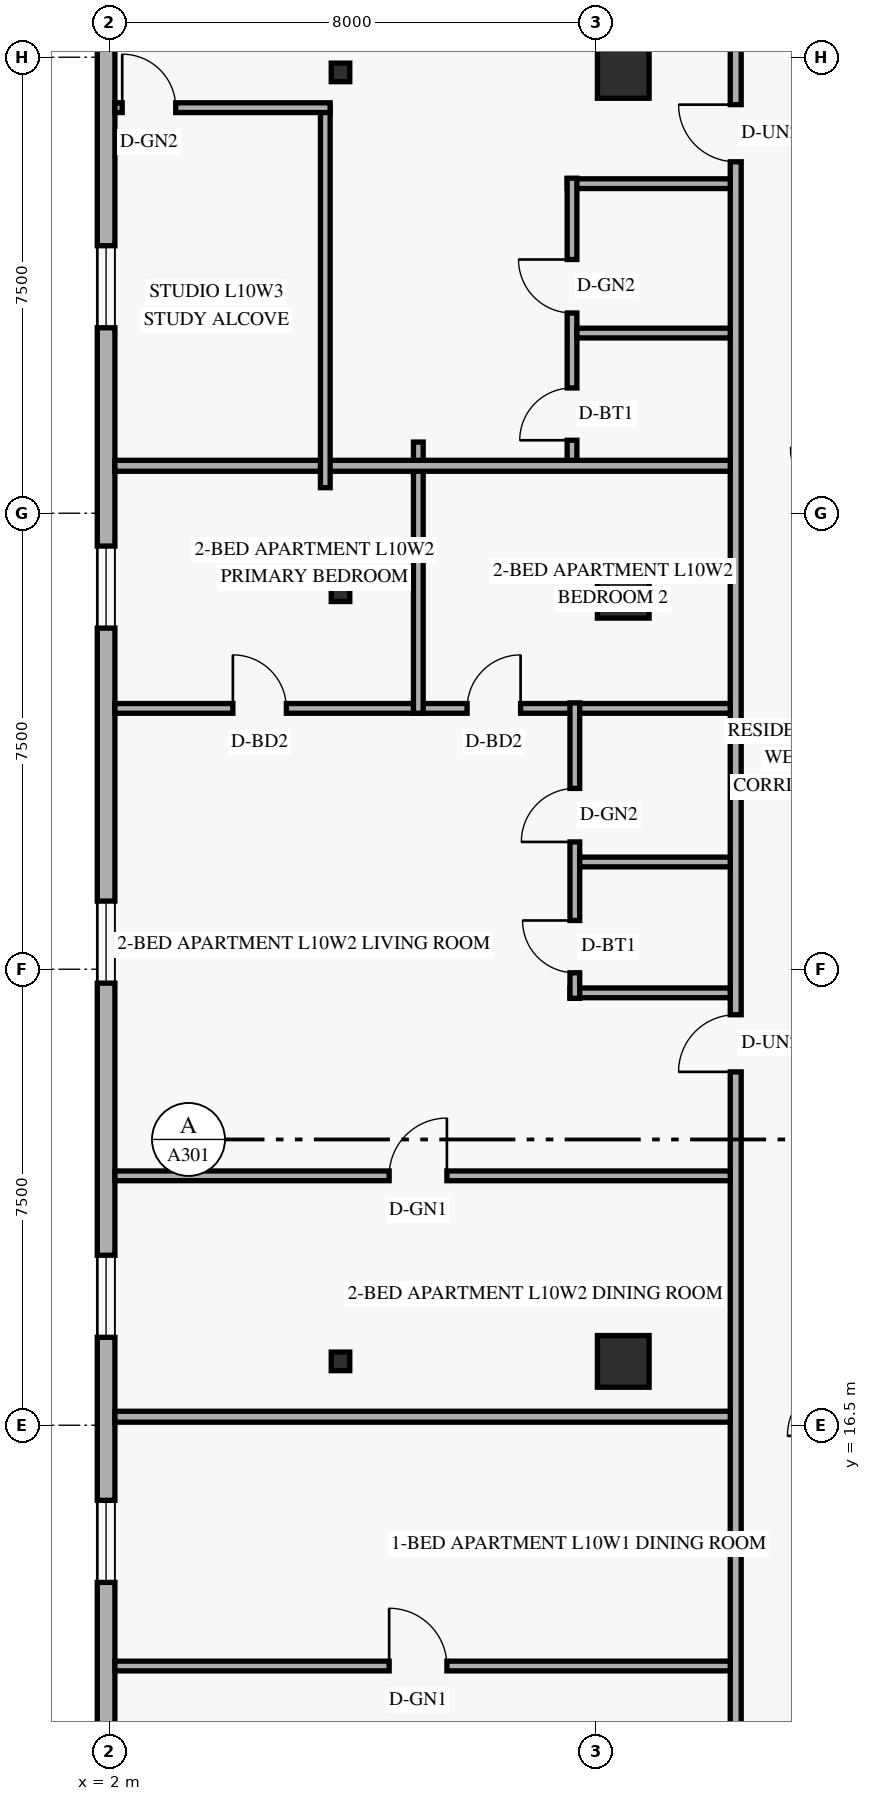
"""IFC4 building model, lengths in metres.
Left out: names, types, materials, properties, quantities, classifications, styles, units other than length and angle.
Written with IfcOpenShell. Run it as: python <this file> out.ifc"""

import sys

from ifc_helpers import new_model, si_unit, direction, frame, frame_2d, origin, origin_2d, place, context, subcontext, project, spatial, rectangle, hollow_rectangle, extrude, element, fill, save


model = new_model("IFC4")
c1 = context("Model", 3, precision=1e-05, world=origin(), true_north=direction((0.0, 1.0)))
c2 = subcontext(c1, "Body", "Model", "MODEL_VIEW")
j1 = project(units=[si_unit("LENGTHUNIT", "METRE"), si_unit("PLANEANGLEUNIT", "RADIAN")], contexts=[c1])
p1 = place(None, origin())
s1 = spatial("IfcSite", under=j1, at=p1, CompositionType="ELEMENT")
p2 = place(p1, origin())
s2 = spatial("IfcBuilding", under=s1, at=p2, CompositionType="ELEMENT")
p3 = place(p2, frame((0.0, 0.0, 42.0)))
s3 = spatial("IfcBuildingStorey", under=s2, at=p3, CompositionType="ELEMENT", Elevation=42.0)
for number, where, z_axis, x_axis in (
    (1, (5.8, 17.55, 0.0), (0.0, 0.0, 1.0), (1.0, 0.0, 0.0)),
    (2, (5.8, 30.2, 0.0), (0.0, 0.0, 1.0), (1.0, 0.0, 0.0)),
    (3, (5.8, 38.75, 0.0), (0.0, 0.0, 1.0), (1.0, 0.0, 0.0)),
):
    element("IfcColumn", number, at=place(p3, frame(where, z_axis=z_axis, x_axis=x_axis)), inside=s3, PredefinedType="COLUMN", context=c2, shape_type="SweptSolid", body=[
        extrude(hollow_rectangle(XDim=0.305, YDim=0.305, WallThickness=0.013, at=origin_2d()), origin(), (0.0, 0.0, 1.0), 3.6),
    ])
for number, where, z_axis, x_axis in (
    (4, (10.45, 17.55, 0.0), (0.0, 0.0, 1.0), (1.0, 0.0, 0.0)),
    (5, (10.45, 30.2, 0.0), (0.0, 0.0, 1.0), (1.0, 0.0, 0.0)),
    (6, (10.45, 38.75, 0.0), (0.0, 0.0, 1.0), (1.0, 0.0, 0.0)),
):
    element("IfcColumn", number, at=place(p3, frame(where, z_axis=z_axis, x_axis=x_axis)), inside=s3, PredefinedType="COLUMN", context=c2, shape_type="SweptSolid", body=[
        extrude(rectangle(XDim=0.85, YDim=0.85, at=origin_2d()), origin(), (0.0, 0.0, 1.0), 3.6),
    ])
p4 = place(p3, frame((1.945, 43.38, 0.0), z_axis=(0.0, 0.0, 1.0), x_axis=(0.0, -1.0, 0.0)))
e7 = element("IfcWall", 7, at=p4, inside=s3, PredefinedType="SOLIDWALL", context=c2, shape_type="SweptSolid", body=[
    extrude(rectangle(XDim=38.76, YDim=0.29, at=frame_2d((19.38, 0.0))), origin(), (0.0, 0.0, 1.0), 3.36),
])
p5 = place(p4, frame((34.125, 0.0, 0.85)))
e8 = element("IfcOpeningElement", 8, at=p5, cuts=e7, PredefinedType="OPENING", context=c2, shape_type="SweptSolid", body=[
    extrude(rectangle(XDim=1.35, YDim=1.55, at=frame_2d((0.675, 0.775))), frame((0.0, 0.155, 0.0), z_axis=(0.0, -1.0, 0.0), x_axis=(1.0, 0.0, 0.0)), (0.0, 0.0, 1.0), 0.31),
])
p6 = place(p4, frame((28.115, 0.0, 0.85)))
e9 = element("IfcOpeningElement", 9, at=p6, cuts=e7, PredefinedType="OPENING", context=c2, shape_type="SweptSolid", body=[
    extrude(rectangle(XDim=1.35, YDim=1.55, at=frame_2d((0.675, 0.775))), frame((0.0, 0.155, 0.0), z_axis=(0.0, -1.0, 0.0), x_axis=(1.0, 0.0, 0.0)), (0.0, 0.0, 1.0), 0.31),
])
p7 = place(p4, frame((24.084, 0.0, 0.85)))
e10 = element("IfcOpeningElement", 10, at=p7, cuts=e7, PredefinedType="OPENING", context=c2, shape_type="SweptSolid", body=[
    extrude(rectangle(XDim=1.35, YDim=1.55, at=frame_2d((0.675, 0.775))), frame((0.0, 0.155, 0.0), z_axis=(0.0, -1.0, 0.0), x_axis=(1.0, 0.0, 0.0)), (0.0, 0.0, 1.0), 0.31),
])
p8 = place(p4, frame((18.259, 0.0, 0.85)))
e11 = element("IfcOpeningElement", 11, at=p8, cuts=e7, PredefinedType="OPENING", context=c2, shape_type="SweptSolid", body=[
    extrude(rectangle(XDim=1.35, YDim=1.55, at=frame_2d((0.675, 0.775))), frame((0.0, 0.155, 0.0), z_axis=(0.0, -1.0, 0.0), x_axis=(1.0, 0.0, 0.0)), (0.0, 0.0, 1.0), 0.31),
])
p9 = place(p4, frame((12.42, 0.0, 0.85)))
e12 = element("IfcOpeningElement", 12, at=p9, cuts=e7, PredefinedType="OPENING", context=c2, shape_type="SweptSolid", body=[
    extrude(rectangle(XDim=1.35, YDim=1.55, at=frame_2d((0.675, 0.775))), frame((0.0, 0.155, 0.0), z_axis=(0.0, -1.0, 0.0), x_axis=(1.0, 0.0, 0.0)), (0.0, 0.0, 1.0), 0.31),
])
p10 = place(p4, frame((7.48, 0.0, 0.85)))
e13 = element("IfcOpeningElement", 13, at=p10, cuts=e7, PredefinedType="OPENING", context=c2, shape_type="SweptSolid", body=[
    extrude(rectangle(XDim=1.35, YDim=1.55, at=frame_2d((0.675, 0.775))), frame((0.0, 0.155, 0.0), z_axis=(0.0, -1.0, 0.0), x_axis=(1.0, 0.0, 0.0)), (0.0, 0.0, 1.0), 0.31),
])
p11 = place(p4, frame((1.93, 0.0, 0.85)))
e14 = element("IfcOpeningElement", 14, at=p11, cuts=e7, PredefinedType="OPENING", context=c2, shape_type="SweptSolid", body=[
    extrude(rectangle(XDim=1.35, YDim=1.55, at=frame_2d((0.675, 0.775))), frame((0.0, 0.155, 0.0), z_axis=(0.0, -1.0, 0.0), x_axis=(1.0, 0.0, 0.0)), (0.0, 0.0, 1.0), 0.31),
])
p12 = place(p3, frame((12.3, 1.29, 0.0), z_axis=(0.0, 0.0, 1.0), x_axis=(0.0, 1.0, 0.0)))
e15 = element("IfcWall", 15, at=p12, inside=s3, PredefinedType="STANDARD", context=c2, shape_type="SweptSolid", body=[
    extrude(rectangle(XDim=45.42, YDim=0.18, at=frame_2d((22.71, 0.0))), origin(), (0.0, 0.0, 1.0), 2.649),
])
p13 = place(p12, frame((8.06, 0.0, 0.0)))
e16 = element("IfcOpeningElement", 16, at=p13, cuts=e15, PredefinedType="OPENING", context=c2, shape_type="SweptSolid", body=[
    extrude(rectangle(XDim=0.94, YDim=2.15, at=frame_2d((0.47, 1.075))), frame((0.0, 0.1, 0.0), z_axis=(0.0, -1.0, 0.0), x_axis=(1.0, 0.0, 0.0)), (0.0, 0.0, 1.0), 0.2),
])
p14 = place(p12, frame((21.021, 0.0, 0.0)))
e17 = element("IfcOpeningElement", 17, at=p14, cuts=e15, PredefinedType="OPENING", context=c2, shape_type="SweptSolid", body=[
    extrude(rectangle(XDim=0.94, YDim=2.15, at=frame_2d((0.47, 1.075))), frame((0.0, 0.1, 0.0), z_axis=(0.0, -1.0, 0.0), x_axis=(1.0, 0.0, 0.0)), (0.0, 0.0, 1.0), 0.2),
])
p15 = place(p12, frame((35.99, 0.0, 0.0)))
e18 = element("IfcOpeningElement", 18, at=p15, cuts=e15, PredefinedType="OPENING", context=c2, shape_type="SweptSolid", body=[
    extrude(rectangle(XDim=0.94, YDim=2.15, at=frame_2d((0.47, 1.075))), frame((0.0, 0.1, 0.0), z_axis=(0.0, -1.0, 0.0), x_axis=(1.0, 0.0, 0.0)), (0.0, 0.0, 1.0), 0.2),
])
p16 = place(p3, frame((2.09, 12.54, 0.0), z_axis=(0.0, 0.0, 1.0), x_axis=(1.0, 0.0, 0.0)))
e19 = element("IfcWall", 19, at=p16, inside=s3, PredefinedType="PARTITIONING", context=c2, shape_type="SweptSolid", body=[
    extrude(rectangle(XDim=10.12, YDim=0.16, at=frame_2d((5.06, 0.0))), origin(), (0.0, 0.0, 1.0), 2.649),
])
p17 = place(p16, frame((4.51, 0.0, 0.0)))
e20 = element("IfcOpeningElement", 20, at=p17, cuts=e19, PredefinedType="OPENING", context=c2, shape_type="SweptSolid", body=[
    extrude(rectangle(XDim=0.95, YDim=2.15, at=frame_2d((0.475, 1.075))), frame((0.0, 0.09, 0.0), z_axis=(0.0, -1.0, 0.0), x_axis=(1.0, 0.0, 0.0)), (0.0, 0.0, 1.0), 0.18),
])
p18 = place(p3, frame((2.09, 16.64, 0.0), z_axis=(0.0, 0.0, 1.0), x_axis=(1.0, 0.0, 0.0)))
e21 = element("IfcWall", 21, at=p18, inside=s3, PredefinedType="PARTITIONING", context=c2, shape_type="SweptSolid", body=[
    extrude(rectangle(XDim=10.12, YDim=0.18, at=frame_2d((5.06, 0.0))), origin(), (0.0, 0.0, 1.0), 2.649),
])
p19 = place(p3, frame((2.09, 28.29, 0.0), z_axis=(0.0, 0.0, 1.0), x_axis=(1.0, 0.0, 0.0)))
e22 = element("IfcWall", 22, at=p19, inside=s3, PredefinedType="PARTITIONING", context=c2, shape_type="SweptSolid", body=[
    extrude(rectangle(XDim=10.12, YDim=0.16, at=frame_2d((5.06, 0.0))), origin(), (0.0, 0.0, 1.0), 2.649),
])
p20 = place(p19, frame((1.94, 0.0, 0.0)))
e23 = element("IfcOpeningElement", 23, at=p20, cuts=e22, PredefinedType="OPENING", context=c2, shape_type="SweptSolid", body=[
    extrude(rectangle(XDim=0.88, YDim=2.14, at=frame_2d((0.44, 1.07))), frame((0.0, 0.09, 0.0), z_axis=(0.0, -1.0, 0.0), x_axis=(1.0, 0.0, 0.0)), (0.0, 0.0, 1.0), 0.18),
])
p21 = place(p19, frame((5.792, 0.0, 0.0)))
e24 = element("IfcOpeningElement", 24, at=p21, cuts=e22, PredefinedType="OPENING", context=c2, shape_type="SweptSolid", body=[
    extrude(rectangle(XDim=0.88, YDim=2.14, at=frame_2d((0.44, 1.07))), frame((0.0, 0.09, 0.0), z_axis=(0.0, -1.0, 0.0), x_axis=(1.0, 0.0, 0.0)), (0.0, 0.0, 1.0), 0.18),
])
p22 = place(p3, frame((9.574, 23.612, 0.0), z_axis=(0.0, 0.0, 1.0), x_axis=(1.0, 0.0, 0.0)))
e25 = element("IfcWall", 25, at=p22, inside=s3, PredefinedType="PLUMBINGWALL", context=c2, shape_type="SweptSolid", body=[
    extrude(rectangle(XDim=2.636, YDim=0.16, at=frame_2d((1.318, 0.0))), origin(), (0.0, 0.0, 1.0), 2.649),
])
p23 = place(p3, frame((9.654, 23.521, 0.0), z_axis=(0.0, 0.0, 1.0), x_axis=(0.0, 1.0, 0.0)))
e26 = element("IfcWall", 26, at=p23, inside=s3, PredefinedType="PLUMBINGWALL", context=c2, shape_type="SweptSolid", body=[
    extrude(rectangle(XDim=4.858, YDim=0.16, at=frame_2d((2.429, 0.0))), origin(), (0.0, 0.0, 1.0), 2.932),
])
p24 = place(p23, frame((0.42, 0.0, 0.0)))
e27 = element("IfcOpeningElement", 27, at=p24, cuts=e26, PredefinedType="OPENING", context=c2, shape_type="SweptSolid", body=[
    extrude(rectangle(XDim=0.86, YDim=2.12, at=frame_2d((0.43, 1.06))), frame((0.0, 0.09, 0.0), z_axis=(0.0, -1.0, 0.0), x_axis=(1.0, 0.0, 0.0)), (0.0, 0.0, 1.0), 0.18),
])
p25 = place(p23, frame((2.572, 0.0, 0.0)))
e28 = element("IfcOpeningElement", 28, at=p25, cuts=e26, PredefinedType="OPENING", context=c2, shape_type="SweptSolid", body=[
    extrude(rectangle(XDim=0.88, YDim=2.12, at=frame_2d((0.44, 1.06))), frame((0.0, 0.09, 0.0), z_axis=(0.0, -1.0, 0.0), x_axis=(1.0, 0.0, 0.0)), (0.0, 0.0, 1.0), 0.18),
])
p26 = place(p3, frame((9.734, 25.764, 0.0), z_axis=(0.0, 0.0, 1.0), x_axis=(1.0, 0.0, 0.0)))
e29 = element("IfcWall", 29, at=p26, inside=s3, PredefinedType="PLUMBINGWALL", context=c2, shape_type="SweptSolid", body=[
    extrude(rectangle(XDim=2.476, YDim=0.16, at=frame_2d((1.238, 0.0))), origin(), (0.0, 0.0, 1.0), 2.649),
])
p27 = place(p3, frame((2.09, 20.602, 0.0), z_axis=(0.0, 0.0, 1.0), x_axis=(1.0, 0.0, 0.0)))
e30 = element("IfcWall", 30, at=p27, inside=s3, PredefinedType="PARTITIONING", context=c2, shape_type="SweptSolid", body=[
    extrude(rectangle(XDim=10.12, YDim=0.16, at=frame_2d((5.06, 0.0))), origin(), (0.0, 0.0, 1.0), 2.649),
])
p28 = place(p27, frame((4.51, 0.0, 0.0)))
e31 = element("IfcOpeningElement", 31, at=p28, cuts=e30, PredefinedType="OPENING", context=c2, shape_type="SweptSolid", body=[
    extrude(rectangle(XDim=0.95, YDim=2.15, at=frame_2d((0.475, 1.075))), frame((0.0, 0.09, 0.0), z_axis=(0.0, -1.0, 0.0), x_axis=(1.0, 0.0, 0.0)), (0.0, 0.0, 1.0), 0.18),
])
p29 = place(p3, frame((7.08, 28.21, 0.0), z_axis=(0.0, 0.0, 1.0), x_axis=(0.0, 1.0, 0.0)))
e32 = element("IfcWall", 32, at=p29, inside=s3, PredefinedType="PARTITIONING", context=c2, shape_type="SweptSolid", body=[
    extrude(rectangle(XDim=4.46, YDim=0.16, at=frame_2d((2.23, 0.0))), origin(), (0.0, 0.0, 1.0), 2.649),
])
p30 = place(p3, frame((2.09, 32.28, 0.0), z_axis=(0.0, 0.0, 1.0), x_axis=(1.0, 0.0, 0.0)))
e33 = element("IfcWall", 33, at=p30, inside=s3, PredefinedType="PARTITIONING", context=c2, shape_type="SweptSolid", body=[
    extrude(rectangle(XDim=10.12, YDim=0.18, at=frame_2d((5.06, 0.0))), origin(), (0.0, 0.0, 1.0), 2.649),
])
p31 = place(p3, frame((9.528, 36.92, 0.0), z_axis=(0.0, 0.0, 1.0), x_axis=(1.0, 0.0, 0.0)))
e34 = element("IfcWall", 34, at=p31, inside=s3, PredefinedType="PLUMBINGWALL", context=c2, shape_type="SweptSolid", body=[
    extrude(rectangle(XDim=2.682, YDim=0.16, at=frame_2d((1.341, 0.0))), origin(), (0.0, 0.0, 1.0), 2.649),
])
p32 = place(p3, frame((9.608, 32.37, 0.0), z_axis=(0.0, 0.0, 1.0), x_axis=(0.0, 1.0, 0.0)))
e35 = element("IfcWall", 35, at=p32, inside=s3, PredefinedType="PLUMBINGWALL", context=c2, shape_type="SweptSolid", body=[
    extrude(rectangle(XDim=4.64, YDim=0.16, at=frame_2d((2.32, 0.0))), origin(), (0.0, 0.0, 1.0), 2.932),
])
p33 = place(p32, frame((0.33, 0.0, 0.0)))
e36 = element("IfcOpeningElement", 36, at=p33, cuts=e35, PredefinedType="OPENING", context=c2, shape_type="SweptSolid", body=[
    extrude(rectangle(XDim=0.86, YDim=2.12, at=frame_2d((0.43, 1.06))), frame((0.0, 0.09, 0.0), z_axis=(0.0, -1.0, 0.0), x_axis=(1.0, 0.0, 0.0)), (0.0, 0.0, 1.0), 0.18),
])
p34 = place(p32, frame((2.423, 0.0, 0.0)))
e37 = element("IfcOpeningElement", 37, at=p34, cuts=e35, PredefinedType="OPENING", context=c2, shape_type="SweptSolid", body=[
    extrude(rectangle(XDim=0.88, YDim=2.12, at=frame_2d((0.44, 1.06))), frame((0.0, 0.09, 0.0), z_axis=(0.0, -1.0, 0.0), x_axis=(1.0, 0.0, 0.0)), (0.0, 0.0, 1.0), 0.18),
])
p35 = place(p3, frame((9.688, 34.463, 0.0), z_axis=(0.0, 0.0, 1.0), x_axis=(1.0, 0.0, 0.0)))
e38 = element("IfcWall", 38, at=p35, inside=s3, PredefinedType="PLUMBINGWALL", context=c2, shape_type="SweptSolid", body=[
    extrude(rectangle(XDim=2.522, YDim=0.16, at=frame_2d((1.261, 0.0))), origin(), (0.0, 0.0, 1.0), 2.649),
])
p36 = place(p3, frame((5.55, 31.92, 0.0), z_axis=(0.0, 0.0, 1.0), x_axis=(0.0, 1.0, 0.0)))
e39 = element("IfcWall", 39, at=p36, inside=s3, PredefinedType="PARTITIONING", context=c2, shape_type="SweptSolid", body=[
    extrude(rectangle(XDim=6.25, YDim=0.16, at=frame_2d((3.125, 0.0))), origin(), (0.0, 0.0, 1.0), 3.36),
])
p37 = place(p3, frame((2.09, 38.17, 0.0), z_axis=(0.0, 0.0, 1.0), x_axis=(1.0, 0.0, 0.0)))
e40 = element("IfcWall", 40, at=p37, inside=s3, PredefinedType="PARTITIONING", context=c2, shape_type="SweptSolid", body=[
    extrude(rectangle(XDim=3.54, YDim=0.16, at=frame_2d((1.77, 0.0))), origin(), (0.0, 0.0, 1.0), 3.36),
])
p38 = place(p37, frame((0.12, 0.0, 0.0)))
e41 = element("IfcOpeningElement", 41, at=p38, cuts=e40, PredefinedType="OPENING", context=c2, shape_type="SweptSolid", body=[
    extrude(rectangle(XDim=0.88, YDim=2.12, at=frame_2d((0.44, 1.06))), frame((0.0, 0.09, 0.0), z_axis=(0.0, -1.0, 0.0), x_axis=(1.0, 0.0, 0.0)), (0.0, 0.0, 1.0), 0.18),
])
p39 = place(p6, origin())
e42 = element("IfcWindow", 42, at=p39, inside=s3, PartitioningType="SINGLE_PANEL", PredefinedType="WINDOW", context=c2, shape_type="SweptSolid", body=[
    extrude(rectangle(XDim=1.35, YDim=1.55, at=frame_2d((0.675, 0.775))), frame((0.0, 0.03, 0.0), z_axis=(0.0, -1.0, 0.0), x_axis=(1.0, 0.0, 0.0)), (0.0, 0.0, 1.0), 0.06),
])
fill(e9, e42)
p40 = place(p7, origin())
e43 = element("IfcWindow", 43, at=p40, inside=s3, PartitioningType="SINGLE_PANEL", PredefinedType="WINDOW", context=c2, shape_type="SweptSolid", body=[
    extrude(rectangle(XDim=1.35, YDim=1.55, at=frame_2d((0.675, 0.775))), frame((0.0, 0.03, 0.0), z_axis=(0.0, -1.0, 0.0), x_axis=(1.0, 0.0, 0.0)), (0.0, 0.0, 1.0), 0.06),
])
fill(e10, e43)
p41 = place(p8, origin())
e44 = element("IfcWindow", 44, at=p41, inside=s3, PartitioningType="SINGLE_PANEL", PredefinedType="WINDOW", context=c2, shape_type="SweptSolid", body=[
    extrude(rectangle(XDim=1.35, YDim=1.55, at=frame_2d((0.675, 0.775))), frame((0.0, 0.03, 0.0), z_axis=(0.0, -1.0, 0.0), x_axis=(1.0, 0.0, 0.0)), (0.0, 0.0, 1.0), 0.06),
])
fill(e11, e44)
p42 = place(p9, origin())
e45 = element("IfcWindow", 45, at=p42, inside=s3, PartitioningType="SINGLE_PANEL", PredefinedType="WINDOW", context=c2, shape_type="SweptSolid", body=[
    extrude(rectangle(XDim=1.35, YDim=1.55, at=frame_2d((0.675, 0.775))), frame((0.0, 0.03, 0.0), z_axis=(0.0, -1.0, 0.0), x_axis=(1.0, 0.0, 0.0)), (0.0, 0.0, 1.0), 0.06),
])
fill(e12, e45)
p43 = place(p10, origin())
e46 = element("IfcWindow", 46, at=p43, inside=s3, PartitioningType="SINGLE_PANEL", PredefinedType="WINDOW", context=c2, shape_type="SweptSolid", body=[
    extrude(rectangle(XDim=1.35, YDim=1.55, at=frame_2d((0.675, 0.775))), frame((0.0, 0.03, 0.0), z_axis=(0.0, -1.0, 0.0), x_axis=(1.0, 0.0, 0.0)), (0.0, 0.0, 1.0), 0.06),
])
fill(e13, e46)
p44 = place(p17, origin())
e47 = element("IfcDoor", 47, at=p44, inside=s3, OperationType="SINGLE_SWING_LEFT", PredefinedType="DOOR", context=c2, shape_type="SweptSolid", body=[
    extrude(rectangle(XDim=0.95, YDim=2.15, at=frame_2d((0.475, 1.075))), frame((0.0, 0.025, 0.0), z_axis=(0.0, -1.0, 0.0), x_axis=(1.0, 0.0, 0.0)), (0.0, 0.0, 1.0), 0.05),
])
fill(e20, e47)
p45 = place(p28, origin())
e48 = element("IfcDoor", 48, at=p45, inside=s3, OperationType="SINGLE_SWING_RIGHT", PredefinedType="DOOR", context=c2, shape_type="SweptSolid", body=[
    extrude(rectangle(XDim=0.95, YDim=2.15, at=frame_2d((0.475, 1.075))), frame((0.0, 0.025, 0.0), z_axis=(0.0, -1.0, 0.0), x_axis=(1.0, 0.0, 0.0)), (0.0, 0.0, 1.0), 0.05),
])
fill(e31, e48)
p46 = place(p14, origin())
e49 = element("IfcDoor", 49, at=p46, inside=s3, OperationType="SINGLE_SWING_LEFT", PredefinedType="DOOR", context=c2, shape_type="SweptSolid", body=[
    extrude(rectangle(XDim=0.94, YDim=2.15, at=frame_2d((0.47, 1.075))), frame((0.0, 0.025, 0.0), z_axis=(0.0, -1.0, 0.0), x_axis=(1.0, 0.0, 0.0)), (0.0, 0.0, 1.0), 0.05),
])
fill(e17, e49)
p47 = place(p24, origin())
e50 = element("IfcDoor", 50, at=p47, inside=s3, OperationType="SINGLE_SWING_RIGHT", PredefinedType="DOOR", context=c2, shape_type="SweptSolid", body=[
    extrude(rectangle(XDim=0.86, YDim=2.12, at=frame_2d((0.43, 1.06))), frame((0.0, 0.025, 0.0), z_axis=(0.0, -1.0, 0.0), x_axis=(1.0, 0.0, 0.0)), (0.0, 0.0, 1.0), 0.05),
])
fill(e27, e50)
p48 = place(p25, origin())
e51 = element("IfcDoor", 51, at=p48, inside=s3, OperationType="SINGLE_SWING_LEFT", PredefinedType="DOOR", context=c2, shape_type="SweptSolid", body=[
    extrude(rectangle(XDim=0.88, YDim=2.12, at=frame_2d((0.44, 1.06))), frame((0.0, 0.025, 0.0), z_axis=(0.0, -1.0, 0.0), x_axis=(1.0, 0.0, 0.0)), (0.0, 0.0, 1.0), 0.05),
])
fill(e28, e51)
p49 = place(p20, origin())
e52 = element("IfcDoor", 52, at=p49, inside=s3, OperationType="SINGLE_SWING_LEFT", PredefinedType="DOOR", context=c2, shape_type="SweptSolid", body=[
    extrude(rectangle(XDim=0.88, YDim=2.14, at=frame_2d((0.44, 1.07))), frame((0.0, 0.025, 0.0), z_axis=(0.0, -1.0, 0.0), x_axis=(1.0, 0.0, 0.0)), (0.0, 0.0, 1.0), 0.05),
])
fill(e23, e52)
p50 = place(p21, origin())
e53 = element("IfcDoor", 53, at=p50, inside=s3, OperationType="SINGLE_SWING_RIGHT", PredefinedType="DOOR", context=c2, shape_type="SweptSolid", body=[
    extrude(rectangle(XDim=0.88, YDim=2.14, at=frame_2d((0.44, 1.07))), frame((0.0, 0.025, 0.0), z_axis=(0.0, -1.0, 0.0), x_axis=(1.0, 0.0, 0.0)), (0.0, 0.0, 1.0), 0.05),
])
fill(e24, e53)
p51 = place(p38, origin())
e54 = element("IfcDoor", 54, at=p51, inside=s3, OperationType="SINGLE_SWING_LEFT", PredefinedType="DOOR", context=c2, shape_type="SweptSolid", body=[
    extrude(rectangle(XDim=0.88, YDim=2.12, at=frame_2d((0.44, 1.06))), frame((0.0, 0.025, 0.0), z_axis=(0.0, -1.0, 0.0), x_axis=(1.0, 0.0, 0.0)), (0.0, 0.0, 1.0), 0.05),
])
fill(e41, e54)
p52 = place(p15, origin())
e55 = element("IfcDoor", 55, at=p52, inside=s3, OperationType="SINGLE_SWING_RIGHT", PredefinedType="DOOR", context=c2, shape_type="SweptSolid", body=[
    extrude(rectangle(XDim=0.94, YDim=2.15, at=frame_2d((0.47, 1.075))), frame((0.0, 0.025, 0.0), z_axis=(0.0, -1.0, 0.0), x_axis=(1.0, 0.0, 0.0)), (0.0, 0.0, 1.0), 0.05),
])
fill(e18, e55)
p53 = place(p33, origin())
e56 = element("IfcDoor", 56, at=p53, inside=s3, OperationType="SINGLE_SWING_LEFT", PredefinedType="DOOR", context=c2, shape_type="SweptSolid", body=[
    extrude(rectangle(XDim=0.86, YDim=2.12, at=frame_2d((0.43, 1.06))), frame((0.0, 0.025, 0.0), z_axis=(0.0, -1.0, 0.0), x_axis=(1.0, 0.0, 0.0)), (0.0, 0.0, 1.0), 0.05),
])
fill(e36, e56)
p54 = place(p34, origin())
e57 = element("IfcDoor", 57, at=p54, inside=s3, OperationType="SINGLE_SWING_RIGHT", PredefinedType="DOOR", context=c2, shape_type="SweptSolid", body=[
    extrude(rectangle(XDim=0.88, YDim=2.12, at=frame_2d((0.44, 1.06))), frame((0.0, 0.025, 0.0), z_axis=(0.0, -1.0, 0.0), x_axis=(1.0, 0.0, 0.0)), (0.0, 0.0, 1.0), 0.05),
])
fill(e37, e57)
save(model, sys.argv[1])
